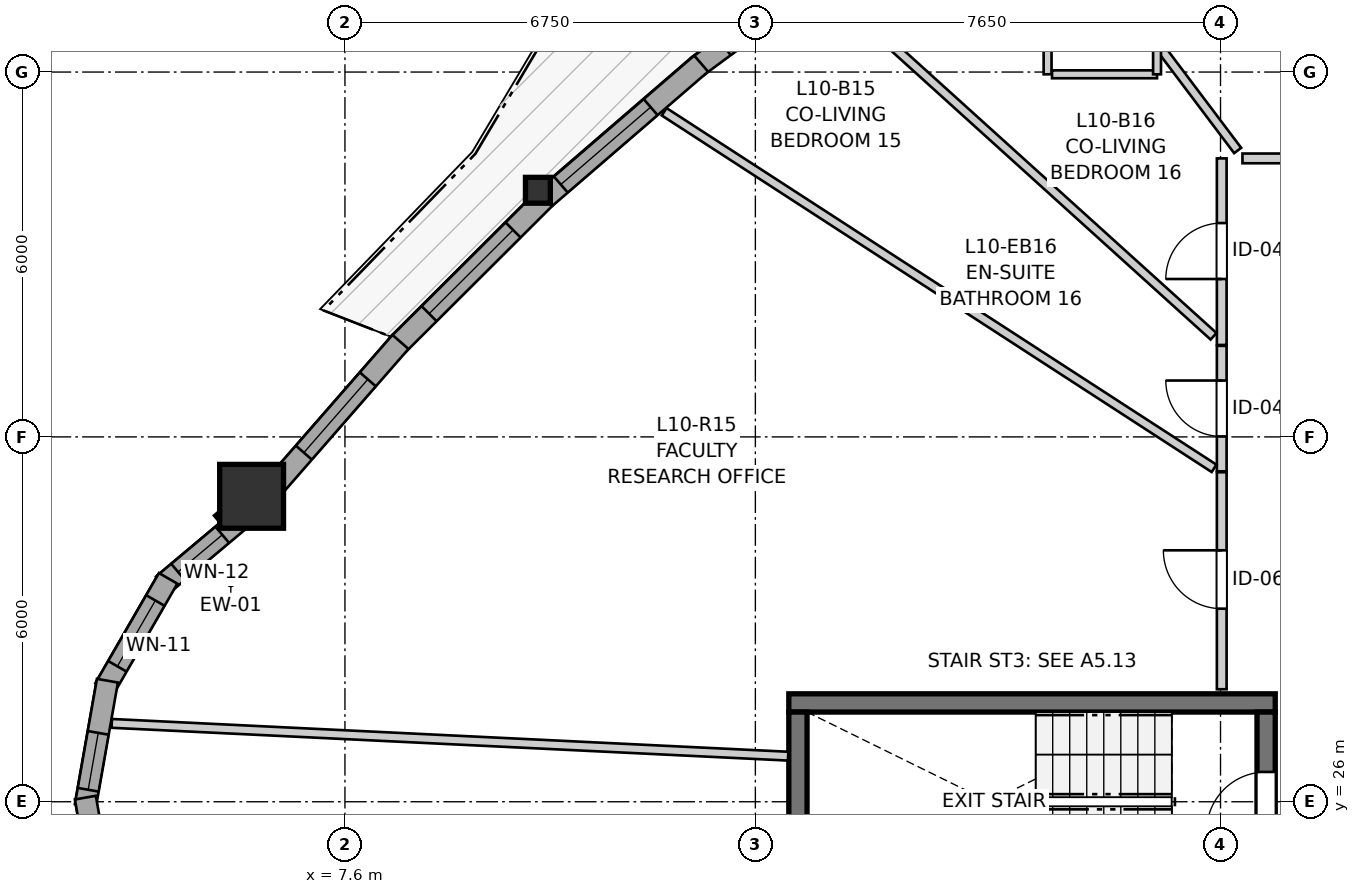
"""IFC4 building model, lengths in metres.
Left out: names, types, materials, properties, quantities, classifications, styles, units other than length and angle.
Written with IfcOpenShell. Run it as: python <this file> out.ifc"""

import sys

from ifc_helpers import new_model, si_unit, direction, frame, frame_2d, origin, origin_2d, place, context, subcontext, project, spatial, rectangle, i_section, extrude, source, transform, mapped, element, fill, save


model = new_model("IFC4")
c1 = context("Model", 3, precision=1e-05, world=origin(), true_north=direction((0.0, 1.0)))
c2 = subcontext(c1, "Body", "Model", "MODEL_VIEW")
j1 = project(units=[si_unit("LENGTHUNIT", "METRE"), si_unit("PLANEANGLEUNIT", "RADIAN")], contexts=[c1])
p1 = place(None, origin())
s1 = spatial("IfcSite", under=j1, at=p1, CompositionType="ELEMENT")
p2 = place(p1, origin())
s2 = spatial("IfcBuilding", under=s1, at=p2, CompositionType="ELEMENT")
p3 = place(p2, frame((0.0, 0.0, 36.6)))
s3 = spatial("IfcBuildingStorey", under=s2, at=p3, CompositionType="ELEMENT", Elevation=36.6)
p4 = place(p3, frame((22.9, 27.625, 0.0), z_axis=(0.0, 0.0, 1.0), x_axis=(-1.0, 0.0, 0.0)))
e1 = element("IfcWall", 1, at=p4, inside=s3, PredefinedType="SHEAR", context=c2, shape_type="SweptSolid", body=[
    extrude(rectangle(XDim=8.0, YDim=0.3, at=frame_2d((4.0, 0.0))), origin(), (0.0, 0.0, 1.0), 2.94),
])
p5 = place(p3, frame((15.05, 27.475, 0.0), z_axis=(0.0, 0.0, 1.0), x_axis=(0.0, -1.0, 0.0)))
e2 = element("IfcWall", 2, at=p5, inside=s3, PredefinedType="SHEAR", context=c2, shape_type="SweptSolid", body=[
    extrude(rectangle(XDim=2.95, YDim=0.3, at=frame_2d((1.475, 0.0))), origin(), (0.0, 0.0, 1.0), 2.94),
])
p6 = place(p3, frame((22.75, 24.525, 0.0), z_axis=(0.0, 0.0, 1.0), x_axis=(0.0, 1.0, 0.0)))
e3 = element("IfcWall", 3, at=p6, inside=s3, PredefinedType="SHEAR", context=c2, shape_type="SweptSolid", body=[
    extrude(rectangle(XDim=2.95, YDim=0.3, at=frame_2d((1.475, 0.0))), origin(), (0.0, 0.0, 1.0), 2.94),
])
p7 = place(p6, frame((0.985, 0.0, 0.0)))
e4 = element("IfcOpeningElement", 4, at=p7, cuts=e3, PredefinedType="OPENING", context=c2, shape_type="SweptSolid", body=[
    extrude(rectangle(XDim=0.98, YDim=2.15, at=frame_2d((0.49, 1.075))), frame((0.0, 0.16, 0.0), z_axis=(0.0, -1.0, 0.0), x_axis=(1.0, 0.0, 0.0)), (0.0, 0.0, 1.0), 0.32),
])
m1 = source(origin(), c2, "Body", "SweptSolid", [
    extrude(rectangle(XDim=1.05, YDim=1.05, at=origin_2d()), origin(), (0.0, 0.0, 1.0), 2.94),
])
p8 = place(p3, frame((6.065, 31.023, 0.0), z_axis=(0.0, 0.0, 1.0), x_axis=(1.0, 0.0, 0.0)))
e5 = element("IfcColumn", 5, at=p8, inside=s3, PredefinedType="COLUMN", context=c2, shape_type="MappedRepresentation", body=[
    mapped(m1, transform((0.0, 0.0, 0.0), x_axis=(1.0, 0.0, 0.0), y_axis=(0.0, 1.0, 0.0), z_axis=(0.0, 0.0, 1.0), scale=1.0)),
])
m2 = source(origin(), c2, "Body", "SweptSolid", [
    extrude(i_section(OverallWidth=0.409, OverallDepth=0.425, WebThickness=0.03, FlangeThickness=0.048, FilletRadius=0.015, at=origin_2d()), origin(), (0.0, 0.0, 1.0), 2.94),
])
p9 = place(p3, frame((10.773, 36.056, 0.0), z_axis=(0.0, 0.0, 1.0), x_axis=(1.0, 0.0, 0.0)))
e6 = element("IfcColumn", 6, at=p9, inside=s3, PredefinedType="PILASTER", context=c2, shape_type="MappedRepresentation", body=[
    mapped(m2, transform((0.0, 0.0, 0.0), x_axis=(1.0, 0.0, 0.0), y_axis=(0.0, 1.0, 0.0), z_axis=(0.0, 0.0, 1.0), scale=1.0)),
])
p10 = place(p3, frame((5.948, 30.696, 0.0), z_axis=(0.0, 0.0, 1.0), x_axis=(-0.766058770736, -0.642770534311, 0.0)))
e7 = element("IfcWall", 7, at=p10, inside=s3, PredefinedType="SOLIDWALL", context=c2, shape_type="SweptSolid", body=[
    extrude(rectangle(XDim=1.752, YDim=0.35, at=frame_2d((0.876, 0.0))), origin(), (0.0, 0.0, 1.0), 2.42),
])
p11 = place(p10, frame((0.476, 0.0, 0.82)))
e8 = element("IfcOpeningElement", 8, at=p11, cuts=e7, PredefinedType="OPENING", context=c2, shape_type="SweptSolid", body=[
    extrude(rectangle(XDim=0.95, YDim=1.35, at=frame_2d((0.475, 0.675))), frame((0.0, 0.185, 0.0), z_axis=(0.0, -1.0, 0.0), x_axis=(1.0, 0.0, 0.0)), (0.0, 0.0, 1.0), 0.37),
])
p12 = place(p3, frame((4.692, 29.674, 0.0), z_axis=(0.0, 0.0, 1.0), x_axis=(-0.49990781971, -0.866078617559, 0.0)))
e9 = element("IfcWall", 9, at=p12, inside=s3, PredefinedType="SOLIDWALL", context=c2, shape_type="SweptSolid", body=[
    extrude(rectangle(XDim=2.09, YDim=0.35, at=frame_2d((1.045, 0.0))), origin(), (0.0, 0.0, 1.0), 2.42),
])
p13 = place(p12, frame((0.42, 0.0, 0.82)))
e10 = element("IfcOpeningElement", 10, at=p13, cuts=e9, PredefinedType="OPENING", context=c2, shape_type="SweptSolid", body=[
    extrude(rectangle(XDim=1.25, YDim=1.35, at=frame_2d((0.625, 0.675))), frame((0.0, 0.185, 0.0), z_axis=(0.0, -1.0, 0.0), x_axis=(1.0, 0.0, 0.0)), (0.0, 0.0, 1.0), 0.37),
])
p14 = place(p3, frame((3.694, 27.991, 0.0), z_axis=(0.0, 0.0, 1.0), x_axis=(-0.173558792186, -0.984823509902, 0.0)))
e11 = element("IfcWall", 11, at=p14, inside=s3, PredefinedType="SOLIDWALL", context=c2, shape_type="SweptSolid", body=[
    extrude(rectangle(XDim=2.09, YDim=0.35, at=frame_2d((1.045, 0.0))), origin(), (0.0, 0.0, 1.0), 2.42),
])
p15 = place(p14, frame((0.871, 0.0, 0.82)))
e12 = element("IfcOpeningElement", 12, at=p15, cuts=e11, PredefinedType="OPENING", context=c2, shape_type="SweptSolid", body=[
    extrude(rectangle(XDim=0.95, YDim=1.35, at=frame_2d((0.475, 0.675))), frame((0.0, 0.185, 0.0), z_axis=(0.0, -1.0, 0.0), x_axis=(1.0, 0.0, 0.0)), (0.0, 0.0, 1.0), 0.37),
])
p16 = place(p3, frame((3.331, 26.068, 0.0), z_axis=(0.0, 0.0, 1.0), x_axis=(0.173558792186, -0.984823509902, 0.0)))
e13 = element("IfcWall", 13, at=p16, inside=s3, PredefinedType="SOLIDWALL", context=c2, shape_type="SweptSolid", body=[
    extrude(rectangle(XDim=2.09, YDim=0.35, at=frame_2d((1.045, 0.0))), origin(), (0.0, 0.0, 1.0), 2.42),
])
p17 = place(p16, frame((0.32, 0.0, 0.82)))
e14 = element("IfcOpeningElement", 14, at=p17, cuts=e13, PredefinedType="OPENING", context=c2, shape_type="SweptSolid", body=[
    extrude(rectangle(XDim=1.45, YDim=1.25, at=frame_2d((0.725, 0.625))), frame((0.0, 0.185, 0.0), z_axis=(0.0, -1.0, 0.0), x_axis=(1.0, 0.0, 0.0)), (0.0, 0.0, 1.0), 0.37),
])
p18 = place(p3, frame((15.846, 39.902, 0.0), z_axis=(0.0, 0.0, 1.0), x_axis=(-0.803789189233, -0.594914228501, 0.0)))
e15 = element("IfcWall", 15, at=p18, inside=s3, PredefinedType="SOLIDWALL", context=c2, shape_type="SweptSolid", body=[
    extrude(rectangle(XDim=3.056, YDim=0.35, at=frame_2d((1.528, 0.0))), origin(), (0.0, 0.0, 1.0), 2.42),
])
p19 = place(p18, frame((1.044, 0.0, 0.82)))
e16 = element("IfcOpeningElement", 16, at=p19, cuts=e15, PredefinedType="OPENING", context=c2, shape_type="SweptSolid", body=[
    extrude(rectangle(XDim=1.45, YDim=1.25, at=frame_2d((0.725, 0.625))), frame((0.0, 0.185, 0.0), z_axis=(0.0, -1.0, 0.0), x_axis=(1.0, 0.0, 0.0)), (0.0, 0.0, 1.0), 0.37),
])
p20 = place(p3, frame((13.458, 38.139, 0.0), z_axis=(0.0, 0.0, 1.0), x_axis=(-0.757450680395, -0.652892385289, 0.0)))
e17 = element("IfcWall", 17, at=p20, inside=s3, PredefinedType="SOLIDWALL", context=c2, shape_type="SweptSolid", body=[
    extrude(rectangle(XDim=3.374, YDim=0.35, at=frame_2d((1.687, 0.0))), origin(), (0.0, 0.0, 1.0), 2.42),
])
p21 = place(p20, frame((1.097, 0.0, 0.82)))
e18 = element("IfcOpeningElement", 18, at=p21, cuts=e17, PredefinedType="OPENING", context=c2, shape_type="SweptSolid", body=[
    extrude(rectangle(XDim=1.95, YDim=1.4, at=frame_2d((0.975, 0.7))), frame((0.0, 0.185, 0.0), z_axis=(0.0, -1.0, 0.0), x_axis=(1.0, 0.0, 0.0)), (0.0, 0.0, 1.0), 0.37),
])
p22 = place(p3, frame((10.883, 35.918, 0.0), z_axis=(0.0, 0.0, 1.0), x_axis=(-0.708386995502, -0.70582424484, 0.0)))
e19 = element("IfcWall", 19, at=p22, inside=s3, PredefinedType="SOLIDWALL", context=c2, shape_type="SweptSolid", body=[
    extrude(rectangle(XDim=3.429, YDim=0.35, at=frame_2d((1.715, 0.0))), origin(), (0.0, 0.0, 1.0), 2.42),
])
p23 = place(p22, frame((0.73, 0.0, 0.82)))
e20 = element("IfcOpeningElement", 20, at=p23, cuts=e19, PredefinedType="OPENING", context=c2, shape_type="SweptSolid", body=[
    extrude(rectangle(XDim=1.95, YDim=1.4, at=frame_2d((0.975, 0.7))), frame((0.0, 0.185, 0.0), z_axis=(0.0, -1.0, 0.0), x_axis=(1.0, 0.0, 0.0)), (0.0, 0.0, 1.0), 0.37),
])
p24 = place(p3, frame((8.513, 33.561, 0.0), z_axis=(0.0, 0.0, 1.0), x_axis=(-0.657640586907, -0.753331838205, 0.0)))
e21 = element("IfcWall", 21, at=p24, inside=s3, PredefinedType="SOLIDWALL", context=c2, shape_type="SweptSolid", body=[
    extrude(rectangle(XDim=3.222, YDim=0.35, at=frame_2d((1.611, 0.0))), origin(), (0.0, 0.0, 1.0), 2.42),
])
p25 = place(p24, frame((0.816, 0.0, 0.82)))
e22 = element("IfcOpeningElement", 22, at=p25, cuts=e21, PredefinedType="OPENING", context=c2, shape_type="SweptSolid", body=[
    extrude(rectangle(XDim=1.6, YDim=1.35, at=frame_2d((0.8, 0.675))), frame((0.0, 0.185, 0.0), z_axis=(0.0, -1.0, 0.0), x_axis=(1.0, 0.0, 0.0)), (0.0, 0.0, 1.0), 0.37),
])
p26 = place(p3, frame((22.02, 27.85, 0.0), z_axis=(0.0, 0.0, 1.0), x_axis=(0.0, 1.0, 0.0)))
e23 = element("IfcWall", 23, at=p26, inside=s3, PredefinedType="PARTITIONING", context=c2, shape_type="SweptSolid", body=[
    extrude(rectangle(XDim=3.569, YDim=0.16, at=frame_2d((1.784, 0.0))), origin(), (0.0, 0.0, 1.0), 2.94),
])
p27 = place(p26, frame((1.325, 0.0, 0.0)))
e24 = element("IfcOpeningElement", 24, at=p27, cuts=e23, PredefinedType="OPENING", context=c2, shape_type="SweptSolid", body=[
    extrude(rectangle(XDim=0.96, YDim=2.1, at=frame_2d((0.48, 1.05))), frame((0.0, 0.09, 0.0), z_axis=(0.0, -1.0, 0.0), x_axis=(1.0, 0.0, 0.0)), (0.0, 0.0, 1.0), 0.18),
])
p28 = place(p3, frame((22.361, 36.58, 0.0), z_axis=(0.0, 0.0, 1.0), x_axis=(1.0, 0.0, 0.0)))
e25 = element("IfcWall", 25, at=p28, inside=s3, PredefinedType="PARTITIONING", context=c2, shape_type="SweptSolid", body=[
    extrude(rectangle(XDim=3.498, YDim=0.16, at=frame_2d((1.749, 0.0))), origin(), (0.0, 0.0, 1.0), 2.548),
])
p29 = place(p28, frame((1.291, 0.0, 0.0)))
e26 = element("IfcOpeningElement", 26, at=p29, cuts=e25, PredefinedType="OPENING", context=c2, shape_type="SweptSolid", body=[
    extrude(rectangle(XDim=0.92, YDim=2.1, at=frame_2d((0.46, 1.05))), frame((0.0, 0.09, 0.0), z_axis=(0.0, -1.0, 0.0), x_axis=(1.0, 0.0, 0.0)), (0.0, 0.0, 1.0), 0.18),
])
p30 = place(p3, frame((22.02, 33.512, 0.0), z_axis=(0.0, 0.0, 1.0), x_axis=(0.0, 1.0, 0.0)))
e27 = element("IfcWall", 27, at=p30, inside=s3, PredefinedType="PARTITIONING", context=c2, shape_type="SweptSolid", body=[
    extrude(rectangle(XDim=3.068, YDim=0.16, at=frame_2d((1.534, 0.0))), origin(), (0.0, 0.0, 1.0), 2.94),
])
p31 = place(p30, frame((1.084, 0.0, 0.0)))
e28 = element("IfcOpeningElement", 28, at=p31, cuts=e27, PredefinedType="OPENING", context=c2, shape_type="SweptSolid", body=[
    extrude(rectangle(XDim=0.92, YDim=2.1, at=frame_2d((0.46, 1.05))), frame((0.0, 0.09, 0.0), z_axis=(0.0, -1.0, 0.0), x_axis=(1.0, 0.0, 0.0)), (0.0, 0.0, 1.0), 0.18),
])
p32 = place(p3, frame((22.02, 31.434, 0.0), z_axis=(0.0, 0.0, 1.0), x_axis=(0.0, 1.0, 0.0)))
e29 = element("IfcWall", 29, at=p32, inside=s3, PredefinedType="PARTITIONING", context=c2, shape_type="SweptSolid", body=[
    extrude(rectangle(XDim=2.063, YDim=0.16, at=frame_2d((1.031, 0.0))), origin(), (0.0, 0.0, 1.0), 2.94),
])
p33 = place(p32, frame((0.573, 0.0, 0.0)))
e30 = element("IfcOpeningElement", 30, at=p33, cuts=e29, PredefinedType="OPENING", context=c2, shape_type="SweptSolid", body=[
    extrude(rectangle(XDim=0.92, YDim=2.1, at=frame_2d((0.46, 1.05))), frame((0.0, 0.09, 0.0), z_axis=(0.0, -1.0, 0.0), x_axis=(1.0, 0.0, 0.0)), (0.0, 0.0, 1.0), 0.18),
])
p34 = place(p3, frame((19.156, 39.863, 0.0), z_axis=(0.0, 0.0, 1.0), x_axis=(0.0, -1.0, 0.0)))
e31 = element("IfcWall", 31, at=p34, inside=s3, PredefinedType="PARTITIONING", context=c2, shape_type="SweptSolid", body=[
    extrude(rectangle(XDim=1.9, YDim=0.13, at=frame_2d((0.95, 0.0))), origin(), (0.0, 0.0, 1.0), 2.94),
])
p35 = place(p34, frame((0.51, 0.0, 0.0)))
e32 = element("IfcOpeningElement", 32, at=p35, cuts=e31, PredefinedType="OPENING", context=c2, shape_type="SweptSolid", body=[
    extrude(rectangle(XDim=0.88, YDim=2.05, at=frame_2d((0.44, 1.025))), frame((0.0, 0.075, 0.0), z_axis=(0.0, -1.0, 0.0), x_axis=(1.0, 0.0, 0.0)), (0.0, 0.0, 1.0), 0.15),
])
p36 = place(p3, frame((3.765, 27.289, 0.0), z_axis=(0.0, 0.0, 1.0), x_axis=(0.998826748689, -0.048426502082, 0.0)))
e33 = element("IfcWall", 33, at=p36, inside=s3, PredefinedType="PARTITIONING", context=c2, shape_type="SweptSolid", body=[
    extrude(rectangle(XDim=11.137, YDim=0.145, at=frame_2d((5.568, 0.0))), origin(), (0.0, 0.0, 1.0), 2.94),
])
p37 = place(p3, frame((12.85, 37.347, 0.0), z_axis=(0.0, 0.0, 1.0), x_axis=(0.839070272759, -0.544023048567, 0.0)))
e34 = element("IfcWall", 34, at=p37, inside=s3, PredefinedType="PARTITIONING", context=c2, shape_type="SweptSolid", body=[
    extrude(rectangle(XDim=10.779, YDim=0.145, at=frame_2d((5.389, 0.0))), origin(), (0.0, 0.0, 1.0), 2.94),
])
p38 = place(p3, frame((15.516, 39.413, 0.0), z_axis=(0.0, 0.0, 1.0), x_axis=(0.741796419009, -0.670625135784, 0.0)))
e35 = element("IfcWall", 35, at=p38, inside=s3, PredefinedType="PARTITIONING", context=c2, shape_type="SweptSolid", body=[
    extrude(rectangle(XDim=8.586, YDim=0.145, at=frame_2d((4.293, 0.0))), origin(), (0.0, 0.0, 1.0), 2.94),
])
p39 = place(p3, frame((20.941, 38.49, 0.0), z_axis=(0.0, 0.0, 1.0), x_axis=(0.601733790382, -0.798696716853, 0.0)))
e36 = element("IfcWall", 36, at=p39, inside=s3, PredefinedType="PARTITIONING", context=c2, shape_type="SweptSolid", body=[
    extrude(rectangle(XDim=2.229, YDim=0.145, at=frame_2d((1.114, 0.0))), origin(), (0.0, 0.0, 1.0), 2.94),
])
p40 = place(p3, frame((19.229, 37.963, 0.0), z_axis=(0.0, 0.0, 1.0), x_axis=(1.0, 0.0, 0.0)))
e37 = element("IfcWall", 37, at=p40, inside=s3, PredefinedType="PARTITIONING", context=c2, shape_type="SweptSolid", body=[
    extrude(rectangle(XDim=1.727, YDim=0.13, at=frame_2d((0.864, 0.0))), origin(), (0.0, 0.0, 1.0), 2.508),
])
p41 = place(p3, frame((20.956, 37.963, 0.0), z_axis=(0.0, 0.0, 1.0), x_axis=(0.0, 1.0, 0.0)))
e38 = element("IfcWall", 38, at=p41, inside=s3, PredefinedType="PARTITIONING", context=c2, shape_type="SweptSolid", body=[
    extrude(rectangle(XDim=0.417, YDim=0.13, at=frame_2d((0.208, 0.0))), origin(), (0.0, 0.0, 1.0), 2.94),
])
m3 = source(origin(), c2, "Body", "SweptSolid", [
    extrude(rectangle(XDim=0.95, YDim=1.35, at=frame_2d((0.475, 0.675))), frame((0.0, 0.03, 0.0), z_axis=(0.0, -1.0, 0.0), x_axis=(1.0, 0.0, 0.0)), (0.0, 0.0, 1.0), 0.06),
])
p42 = place(p11, origin())
e39 = element("IfcWindow", 39, at=p42, inside=s3, PartitioningType="SINGLE_PANEL", PredefinedType="WINDOW", context=c2, shape_type="MappedRepresentation", body=[
    mapped(m3, transform((0.0, 0.0, 0.0), x_axis=(1.0, 0.0, 0.0), y_axis=(0.0, 1.0, 0.0), z_axis=(0.0, 0.0, 1.0), scale=1.0)),
])
fill(e8, e39)
m4 = source(origin(), c2, "Body", "SweptSolid", [
    extrude(rectangle(XDim=1.25, YDim=1.35, at=frame_2d((0.625, 0.675))), frame((0.0, 0.03, 0.0), z_axis=(0.0, -1.0, 0.0), x_axis=(1.0, 0.0, 0.0)), (0.0, 0.0, 1.0), 0.06),
])
p43 = place(p13, origin())
e40 = element("IfcWindow", 40, at=p43, inside=s3, PartitioningType="SINGLE_PANEL", PredefinedType="WINDOW", context=c2, shape_type="MappedRepresentation", body=[
    mapped(m4, transform((0.0, 0.0, 0.0), x_axis=(1.0, 0.0, 0.0), y_axis=(0.0, 1.0, 0.0), z_axis=(0.0, 0.0, 1.0), scale=1.0)),
])
fill(e10, e40)
p44 = place(p15, origin())
e41 = element("IfcWindow", 41, at=p44, inside=s3, PartitioningType="SINGLE_PANEL", PredefinedType="WINDOW", context=c2, shape_type="MappedRepresentation", body=[
    mapped(m3, transform((0.0, 0.0, 0.0), x_axis=(1.0, 0.0, 0.0), y_axis=(0.0, 1.0, 0.0), z_axis=(0.0, 0.0, 1.0), scale=1.0)),
])
fill(e12, e41)
m5 = source(origin(), c2, "Body", "SweptSolid", [
    extrude(rectangle(XDim=1.95, YDim=1.4, at=frame_2d((0.975, 0.7))), frame((0.0, 0.03, 0.0), z_axis=(0.0, -1.0, 0.0), x_axis=(1.0, 0.0, 0.0)), (0.0, 0.0, 1.0), 0.06),
])
p45 = place(p21, origin())
e42 = element("IfcWindow", 42, at=p45, inside=s3, PartitioningType="SINGLE_PANEL", PredefinedType="WINDOW", context=c2, shape_type="MappedRepresentation", body=[
    mapped(m5, transform((0.0, 0.0, 0.0), x_axis=(1.0, 0.0, 0.0), y_axis=(0.0, 1.0, 0.0), z_axis=(0.0, 0.0, 1.0), scale=1.0)),
])
fill(e18, e42)
p46 = place(p23, origin())
e43 = element("IfcWindow", 43, at=p46, inside=s3, PartitioningType="SINGLE_PANEL", PredefinedType="WINDOW", context=c2, shape_type="MappedRepresentation", body=[
    mapped(m5, transform((0.0, 0.0, 0.0), x_axis=(1.0, 0.0, 0.0), y_axis=(0.0, 1.0, 0.0), z_axis=(0.0, 0.0, 1.0), scale=1.0)),
])
fill(e20, e43)
m6 = source(origin(), c2, "Body", "SweptSolid", [
    extrude(rectangle(XDim=1.6, YDim=1.35, at=frame_2d((0.8, 0.675))), frame((0.0, 0.03, 0.0), z_axis=(0.0, -1.0, 0.0), x_axis=(1.0, 0.0, 0.0)), (0.0, 0.0, 1.0), 0.06),
])
p47 = place(p25, origin())
e44 = element("IfcWindow", 44, at=p47, inside=s3, PartitioningType="SINGLE_PANEL", PredefinedType="WINDOW", context=c2, shape_type="MappedRepresentation", body=[
    mapped(m6, transform((0.0, 0.0, 0.0), x_axis=(1.0, 0.0, 0.0), y_axis=(0.0, 1.0, 0.0), z_axis=(0.0, 0.0, 1.0), scale=1.0)),
])
fill(e22, e44)
m7 = source(origin(), c2, "Body", "SweptSolid", [
    extrude(rectangle(XDim=0.98, YDim=2.15, at=frame_2d((0.49, 1.075))), frame((0.0, 0.025, 0.0), z_axis=(0.0, -1.0, 0.0), x_axis=(1.0, 0.0, 0.0)), (0.0, 0.0, 1.0), 0.05),
])
p48 = place(p7, origin())
e45 = element("IfcDoor", 45, at=p48, inside=s3, OperationType="SINGLE_SWING_LEFT", PredefinedType="DOOR", context=c2, shape_type="MappedRepresentation", body=[
    mapped(m7, transform((0.0, 0.0, 0.0), x_axis=(1.0, 0.0, 0.0), y_axis=(0.0, 1.0, 0.0), z_axis=(0.0, 0.0, 1.0), scale=1.0)),
])
fill(e4, e45)
m8 = source(origin(), c2, "Body", "SweptSolid", [
    extrude(rectangle(XDim=0.96, YDim=2.1, at=frame_2d((0.48, 1.05))), frame((0.0, 0.025, 0.0), z_axis=(0.0, -1.0, 0.0), x_axis=(1.0, 0.0, 0.0)), (0.0, 0.0, 1.0), 0.05),
])
p49 = place(p27, origin())
e46 = element("IfcDoor", 46, at=p49, inside=s3, OperationType="SINGLE_SWING_RIGHT", PredefinedType="DOOR", context=c2, shape_type="MappedRepresentation", body=[
    mapped(m8, transform((0.0, 0.0, 0.0), x_axis=(1.0, 0.0, 0.0), y_axis=(0.0, 1.0, 0.0), z_axis=(0.0, 0.0, 1.0), scale=1.0)),
])
fill(e24, e46)
m9 = source(origin(), c2, "Body", "SweptSolid", [
    extrude(rectangle(XDim=0.92, YDim=2.1, at=frame_2d((0.46, 1.05))), frame((0.0, 0.025, 0.0), z_axis=(0.0, -1.0, 0.0), x_axis=(1.0, 0.0, 0.0)), (0.0, 0.0, 1.0), 0.05),
])
p50 = place(p31, origin())
e47 = element("IfcDoor", 47, at=p50, inside=s3, OperationType="SINGLE_SWING_LEFT", PredefinedType="DOOR", context=c2, shape_type="MappedRepresentation", body=[
    mapped(m9, transform((0.0, 0.0, 0.0), x_axis=(1.0, 0.0, 0.0), y_axis=(0.0, 1.0, 0.0), z_axis=(0.0, 0.0, 1.0), scale=1.0)),
])
fill(e28, e47)
p51 = place(p33, origin())
e48 = element("IfcDoor", 48, at=p51, inside=s3, OperationType="SINGLE_SWING_RIGHT", PredefinedType="DOOR", context=c2, shape_type="MappedRepresentation", body=[
    mapped(m9, transform((0.0, 0.0, 0.0), x_axis=(1.0, 0.0, 0.0), y_axis=(0.0, 1.0, 0.0), z_axis=(0.0, 0.0, 1.0), scale=1.0)),
])
fill(e30, e48)
save(model, sys.argv[1])
